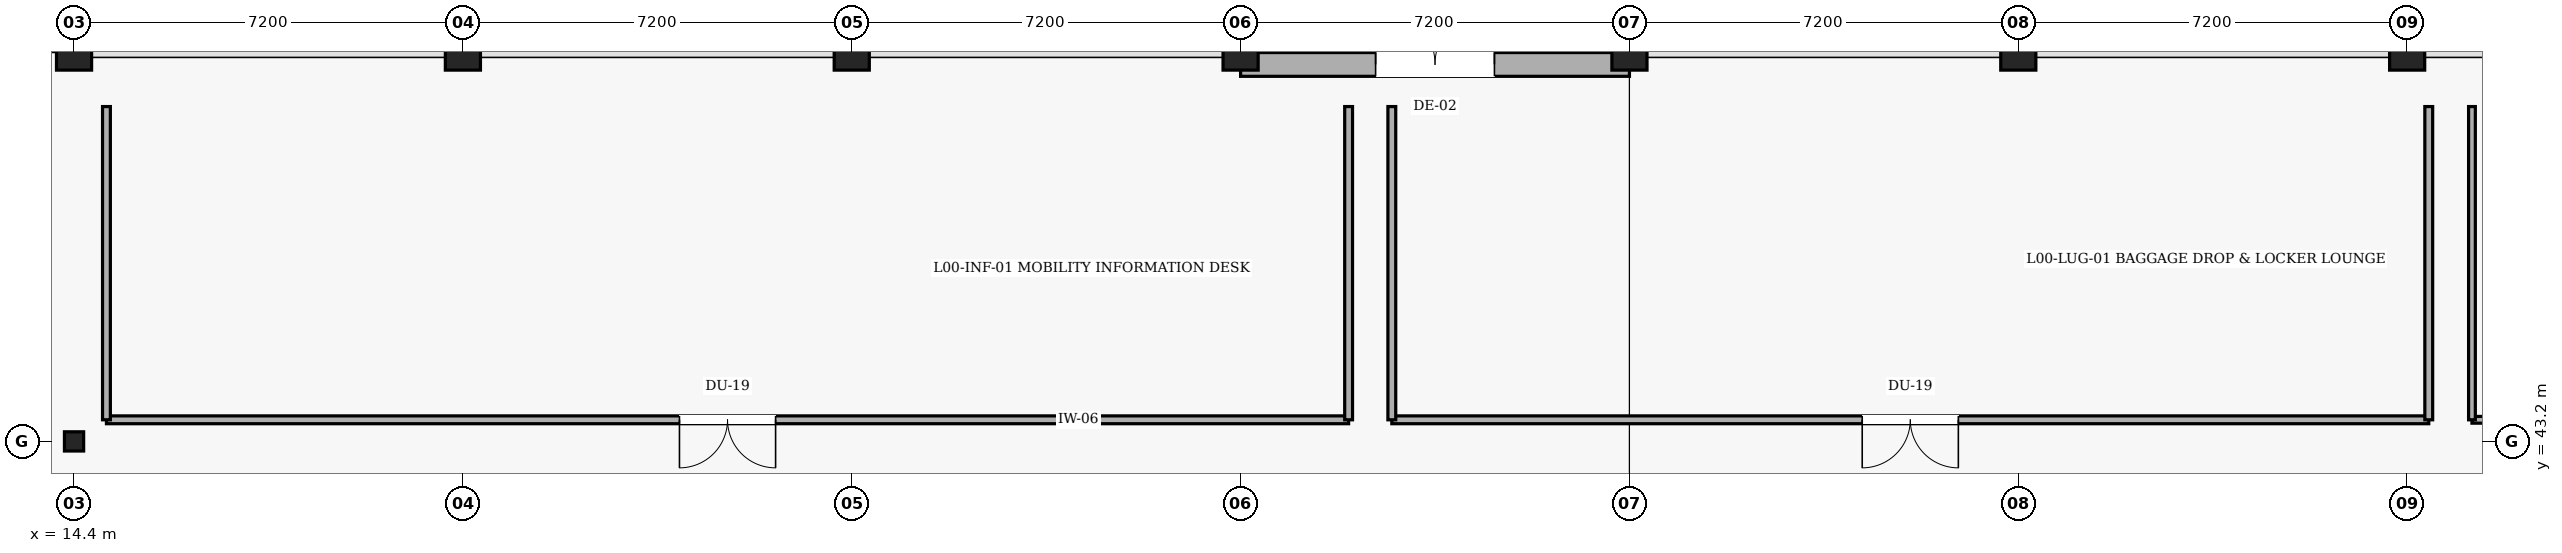
"""IFC4 building model, lengths in metres.
Left out: names, types, materials, properties, quantities, classifications, styles, units other than length and angle.
Written with IfcOpenShell. Run it as: python <this file> out.ifc"""

import sys

from ifc_helpers import new_model, si_unit, direction, frame, frame_2d, origin, origin_2d, place, context, subcontext, project, spatial, rectangle, hollow_circle, extrude, element, fill, save


model = new_model("IFC4")
c1 = context("Model", 3, precision=1e-05, world=origin(), true_north=direction((0.0, 1.0)))
c2 = subcontext(c1, "Body", "Model", "MODEL_VIEW")
j1 = project(units=[si_unit("LENGTHUNIT", "METRE"), si_unit("PLANEANGLEUNIT", "RADIAN")], contexts=[c1])
p1 = place(None, origin())
s1 = spatial("IfcSite", under=j1, at=p1, CompositionType="ELEMENT")
p2 = place(p1, origin())
s2 = spatial("IfcBuilding", under=s1, at=p2, CompositionType="ELEMENT")
p3 = place(p2, origin())
s3 = spatial("IfcBuildingStorey", under=s2, at=p3, CompositionType="ELEMENT", Elevation=0.0)
p4 = place(p3, frame((14.4, 43.2, 0.0), z_axis=(0.0, 0.0, 1.0), x_axis=(1.0, 0.0, 0.0)))
e1 = element("IfcColumn", 1, at=p4, inside=s3, PredefinedType="COLUMN", context=c2, shape_type="SweptSolid", body=[
    extrude(hollow_circle(Radius=0.178, WallThickness=0.016, at=origin_2d()), origin(), (0.0, 0.0, 1.0), 5.1),
])
for number, where, z_axis, x_axis in (
    (2, (14.4, 50.4, 0.0), (0.0, 0.0, 1.0), (1.0, 0.0, 0.0)),
    (3, (21.6, 50.4, 0.0), (0.0, 0.0, 1.0), (1.0, 0.0, 0.0)),
    (4, (28.8, 50.4, 0.0), (0.0, 0.0, 1.0), (1.0, 0.0, 0.0)),
    (5, (36.0, 50.4, 0.0), (0.0, 0.0, 1.0), (1.0, 0.0, 0.0)),
    (6, (43.2, 50.4, 0.0), (0.0, 0.0, 1.0), (1.0, 0.0, 0.0)),
    (7, (50.4, 50.4, 0.0), (0.0, 0.0, 1.0), (1.0, 0.0, 0.0)),
    (8, (57.6, 50.4, 0.0), (0.0, 0.0, 1.0), (1.0, 0.0, 0.0)),
):
    element("IfcColumn", number, at=place(p3, frame(where, z_axis=z_axis, x_axis=x_axis)), inside=s3, PredefinedType="COLUMN", context=c2, shape_type="SweptSolid", body=[
        extrude(rectangle(XDim=0.65, YDim=0.65, at=origin_2d()), origin(), (0.0, 0.0, 1.0), 5.4),
    ])
p5 = place(p3, frame((36.0, 50.18, 0.0), z_axis=(0.0, 0.0, 1.0), x_axis=(1.0, 0.0, 0.0)))
e9 = element("IfcWall", 9, at=p5, inside=s3, PredefinedType="SOLIDWALL", context=c2, shape_type="SweptSolid", body=[
    extrude(rectangle(XDim=7.2, YDim=0.44, at=frame_2d((3.6, 0.0))), origin(), (0.0, 0.0, 1.0), 5.1),
])
p6 = place(p5, frame((2.5, 0.0, 0.0)))
e10 = element("IfcOpeningElement", 10, at=p6, cuts=e9, PredefinedType="OPENING", context=c2, shape_type="SweptSolid", body=[
    extrude(rectangle(XDim=2.2, YDim=2.4, at=frame_2d((1.1, 1.2))), frame((0.0, 0.23, 0.0), z_axis=(0.0, -1.0, 0.0), x_axis=(1.0, 0.0, 0.0)), (0.0, 0.0, 1.0), 0.46),
])
p7 = place(p3, frame((38.0, 43.6, 0.0), z_axis=(0.0, 0.0, 1.0), x_axis=(-1.0, 0.0, 0.0)))
e11 = element("IfcWall", 11, at=p7, inside=s3, PredefinedType="PARTITIONING", context=c2, shape_type="SweptSolid", body=[
    extrude(rectangle(XDim=23.0, YDim=0.145, at=frame_2d((11.5, 0.0))), origin(), (0.0, 0.0, 1.0), 5.05),
])
p8 = place(p7, frame((10.61, 0.0, 0.0)))
e12 = element("IfcOpeningElement", 12, at=p8, cuts=e11, PredefinedType="OPENING", context=c2, shape_type="SweptSolid", body=[
    extrude(rectangle(XDim=1.78, YDim=2.28, at=frame_2d((0.89, 1.14))), frame((0.0, 0.083, 0.0), z_axis=(0.0, -1.0, 0.0), x_axis=(1.0, 0.0, 0.0)), (0.0, 0.0, 1.0), 0.165),
])
for number, where, z_axis, x_axis in (
    (13, (38.0, 49.4, 0.0), (0.0, 0.0, 1.0), (0.0, -1.0, 0.0)),
    (14, (15.0, 43.6, 0.0), (0.0, 0.0, 1.0), (0.0, 1.0, 0.0)),
):
    element("IfcWall", number, at=place(p3, frame(where, z_axis=z_axis, x_axis=x_axis)), inside=s3, PredefinedType="PARTITIONING", context=c2, shape_type="SweptSolid", body=[
        extrude(rectangle(XDim=5.8, YDim=0.145, at=frame_2d((2.9, 0.0))), origin(), (0.0, 0.0, 1.0), 5.05),
    ])
p9 = place(p3, frame((58.0, 43.6, 0.0), z_axis=(0.0, 0.0, 1.0), x_axis=(-1.0, 0.0, 0.0)))
e15 = element("IfcWall", 15, at=p9, inside=s3, PredefinedType="PARTITIONING", context=c2, shape_type="SweptSolid", body=[
    extrude(rectangle(XDim=19.2, YDim=0.145, at=frame_2d((9.6, 0.0))), origin(), (0.0, 0.0, 1.0), 5.05),
])
p10 = place(p9, frame((8.71, 0.0, 0.0)))
e16 = element("IfcOpeningElement", 16, at=p10, cuts=e15, PredefinedType="OPENING", context=c2, shape_type="SweptSolid", body=[
    extrude(rectangle(XDim=1.78, YDim=2.28, at=frame_2d((0.89, 1.14))), frame((0.0, 0.083, 0.0), z_axis=(0.0, -1.0, 0.0), x_axis=(1.0, 0.0, 0.0)), (0.0, 0.0, 1.0), 0.165),
])
for number, where, z_axis, x_axis in (
    (17, (58.0, 49.4, 0.0), (0.0, 0.0, 1.0), (0.0, -1.0, 0.0)),
    (18, (38.8, 43.6, 0.0), (0.0, 0.0, 1.0), (0.0, 1.0, 0.0)),
):
    element("IfcWall", number, at=place(p3, frame(where, z_axis=z_axis, x_axis=x_axis)), inside=s3, PredefinedType="PARTITIONING", context=c2, shape_type="SweptSolid", body=[
        extrude(rectangle(XDim=5.8, YDim=0.145, at=frame_2d((2.9, 0.0))), origin(), (0.0, 0.0, 1.0), 5.05),
    ])
p11 = place(p3, frame((68.4, 43.6, 0.0), z_axis=(0.0, 0.0, 1.0), x_axis=(-1.0, 0.0, 0.0)))
e19 = element("IfcWall", 19, at=p11, inside=s3, PredefinedType="PARTITIONING", context=c2, shape_type="SweptSolid", body=[
    extrude(rectangle(XDim=9.6, YDim=0.125, at=frame_2d((4.8, 0.0))), origin(), (0.0, 0.0, 1.0), 5.05),
])
p12 = place(p11, frame((3.91, 0.0, 0.0)))
e20 = element("IfcOpeningElement", 20, at=p12, cuts=e19, PredefinedType="OPENING", context=c2, shape_type="SweptSolid", body=[
    extrude(rectangle(XDim=1.78, YDim=2.28, at=frame_2d((0.89, 1.14))), frame((0.0, 0.073, 0.0), z_axis=(0.0, -1.0, 0.0), x_axis=(1.0, 0.0, 0.0)), (0.0, 0.0, 1.0), 0.145),
])
p13 = place(p3, frame((58.8, 43.6, 0.0), z_axis=(0.0, 0.0, 1.0), x_axis=(0.0, 1.0, 0.0)))
e21 = element("IfcWall", 21, at=p13, inside=s3, PredefinedType="PARTITIONING", context=c2, shape_type="SweptSolid", body=[
    extrude(rectangle(XDim=5.8, YDim=0.125, at=frame_2d((2.9, 0.0))), origin(), (0.0, 0.0, 1.0), 5.05),
])
p14 = place(p6, origin())
e22 = element("IfcDoor", 22, at=p14, inside=s3, OperationType="DOUBLE_DOOR_SINGLE_SWING", PredefinedType="DOOR", context=c2, shape_type="SweptSolid", body=[
    extrude(rectangle(XDim=2.2, YDim=2.4, at=frame_2d((1.1, 1.2))), frame((0.0, 0.025, 0.0), z_axis=(0.0, -1.0, 0.0), x_axis=(1.0, 0.0, 0.0)), (0.0, 0.0, 1.0), 0.05),
])
fill(e10, e22)
p15 = place(p8, origin())
e23 = element("IfcDoor", 23, at=p15, inside=s3, OperationType="DOUBLE_DOOR_SINGLE_SWING", PredefinedType="DOOR", context=c2, shape_type="SweptSolid", body=[
    extrude(rectangle(XDim=1.78, YDim=2.28, at=frame_2d((0.89, 1.14))), frame((0.0, 0.025, 0.0), z_axis=(0.0, -1.0, 0.0), x_axis=(1.0, 0.0, 0.0)), (0.0, 0.0, 1.0), 0.05),
])
fill(e12, e23)
p16 = place(p10, origin())
e24 = element("IfcDoor", 24, at=p16, inside=s3, OperationType="DOUBLE_DOOR_SINGLE_SWING", PredefinedType="DOOR", context=c2, shape_type="SweptSolid", body=[
    extrude(rectangle(XDim=1.78, YDim=2.28, at=frame_2d((0.89, 1.14))), frame((0.0, 0.025, 0.0), z_axis=(0.0, -1.0, 0.0), x_axis=(1.0, 0.0, 0.0)), (0.0, 0.0, 1.0), 0.05),
])
fill(e16, e24)
save(model, sys.argv[1])
